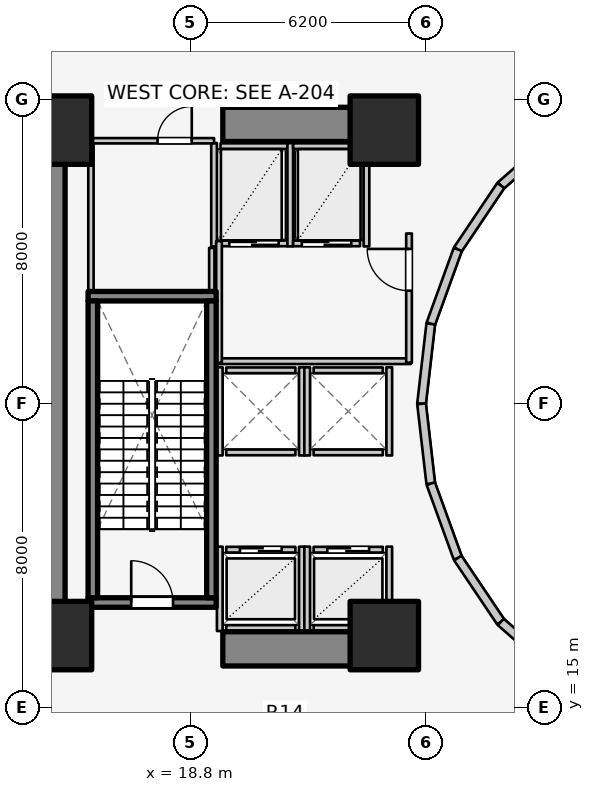
"""IFC4 building model, lengths in metres.
Left out: names, types, materials, properties, quantities, classifications, styles, units other than length and angle.
Written with IfcOpenShell. Run it as: python <this file> out.ifc"""

import sys

from ifc_helpers import new_model, si_unit, direction, frame, frame_2d, origin, origin_2d, place, context, subcontext, project, spatial, rectangle, extrude, element, fill, save


model = new_model("IFC4")
c1 = context("Model", 3, precision=1e-05, world=origin(), true_north=direction((0.0, 1.0)))
c2 = subcontext(c1, "Body", "Model", "MODEL_VIEW")
j1 = project(units=[si_unit("LENGTHUNIT", "METRE"), si_unit("PLANEANGLEUNIT", "RADIAN")], contexts=[c1])
p1 = place(None, origin())
s1 = spatial("IfcSite", under=j1, at=p1, CompositionType="ELEMENT")
p2 = place(p1, origin())
s2 = spatial("IfcBuilding", under=s1, at=p2, CompositionType="ELEMENT")
p3 = place(p2, frame((0.0, 0.0, 9.2)))
s3 = spatial("IfcBuildingStorey", under=s2, at=p3, CompositionType="ELEMENT", Elevation=9.2)
p4 = place(p3, frame((15.05, 17.05, 0.0), z_axis=(0.0, 0.0, 1.0), x_axis=(0.0, 1.0, 0.0)))
e1 = element("IfcWall", 1, at=p4, inside=s3, PredefinedType="SHEAR", context=c2, shape_type="SweptSolid", body=[
    extrude(rectangle(XDim=12.8, YDim=0.9, at=frame_2d((6.4, 0.0))), origin(), (0.0, 0.0, 1.0), 4.6),
])
for number, where, z_axis, x_axis in (
    (2, (19.65, 16.55, 0.0), (0.0, 0.0, 1.0), (1.0, 0.0, 0.0)),
    (3, (19.65, 30.35, 0.0), (0.0, 0.0, 1.0), (1.0, 0.0, 0.0)),
):
    element("IfcWall", number, at=place(p3, frame(where, z_axis=z_axis, x_axis=x_axis)), inside=s3, PredefinedType="SHEAR", context=c2, shape_type="SweptSolid", body=[
        extrude(rectangle(XDim=4.5, YDim=0.9, at=frame_2d((2.25, 0.0))), origin(), (0.0, 0.0, 1.0), 4.6),
    ])
p5 = place(p3, frame((16.105, 17.77, 0.0), z_axis=(0.0, 0.0, 1.0), x_axis=(1.0, 0.0, 0.0)))
e4 = element("IfcWall", 4, at=p5, inside=s3, PredefinedType="SOLIDWALL", context=c2, shape_type="SweptSolid", body=[
    extrude(rectangle(XDim=3.37, YDim=0.25, at=frame_2d((1.685, 0.0))), origin(), (0.0, 0.0, 1.0), 4.6),
])
p6 = place(p5, frame((1.135, 0.0, 0.0)))
e5 = element("IfcOpeningElement", 5, at=p6, cuts=e4, PredefinedType="OPENING", context=c2, shape_type="SweptSolid", body=[
    extrude(rectangle(XDim=1.1, YDim=2.1, at=frame_2d((0.55, 1.05))), frame((0.0, 0.135, 0.0), z_axis=(0.0, -1.0, 0.0), x_axis=(1.0, 0.0, 0.0)), (0.0, 0.0, 1.0), 0.27),
])
p7 = place(p3, frame((16.105, 25.83, 0.0), z_axis=(0.0, 0.0, 1.0), x_axis=(1.0, 0.0, 0.0)))
e6 = element("IfcWall", 6, at=p7, inside=s3, PredefinedType="SOLIDWALL", context=c2, shape_type="SweptSolid", body=[
    extrude(rectangle(XDim=3.37, YDim=0.25, at=frame_2d((1.685, 0.0))), origin(), (0.0, 0.0, 1.0), 4.6),
])
for number, where, z_axis, x_axis in (
    (7, (16.23, 17.895, 0.0), (0.0, 0.0, 1.0), (0.0, 1.0, 0.0)),
    (8, (19.35, 17.895, 0.0), (0.0, 0.0, 1.0), (0.0, 1.0, 0.0)),
):
    element("IfcWall", number, at=place(p3, frame(where, z_axis=z_axis, x_axis=x_axis)), inside=s3, PredefinedType="SOLIDWALL", context=c2, shape_type="SweptSolid", body=[
        extrude(rectangle(XDim=7.81, YDim=0.25, at=frame_2d((3.905, 0.0))), origin(), (0.0, 0.0, 1.0), 4.6),
    ])
for number, where, z_axis, x_axis in (
    (9, (15.3, 16.9, 0.0), (0.0, 0.0, 1.0), (1.0, 0.0, 0.0)),
    (10, (23.9, 16.9, 0.0), (0.0, 0.0, 1.0), (1.0, 0.0, 0.0)),
    (11, (23.9, 30.2, 0.0), (0.0, 0.0, 1.0), (1.0, 0.0, 0.0)),
    (12, (15.3, 30.2, 0.0), (0.0, 0.0, 1.0), (1.0, 0.0, 0.0)),
):
    element("IfcColumn", number, at=place(p3, frame(where, z_axis=z_axis, x_axis=x_axis)), inside=s3, PredefinedType="COLUMN", context=c2, shape_type="SweptSolid", body=[
        extrude(rectangle(XDim=1.8, YDim=1.8, at=origin_2d()), origin(), (0.0, 0.0, 1.0), 4.6),
    ])
p8 = place(p3, frame((28.44, 30.032, 0.0), z_axis=(0.0, 0.0, 1.0), x_axis=(-0.752576694707, -0.658504607869, 0.0)))
e13 = element("IfcWall", 13, at=p8, inside=s3, PredefinedType="STANDARD", context=c2, shape_type="SweptSolid", body=[
    extrude(rectangle(XDim=1.959, YDim=0.23, at=frame_2d((0.98, 0.0))), origin(), (0.0, 0.0, 1.0), 3.28),
])
p9 = place(p3, frame((26.965, 28.742, 0.0), z_axis=(0.0, 0.0, 1.0), x_axis=(-0.558197800898, -0.829707909492, 0.0)))
e14 = element("IfcWall", 14, at=p9, inside=s3, PredefinedType="STANDARD", context=c2, shape_type="SweptSolid", body=[
    extrude(rectangle(XDim=2.027, YDim=0.23, at=frame_2d((1.013, 0.0))), origin(), (0.0, 0.0, 1.0), 3.28),
])
p10 = place(p3, frame((25.834, 27.06, 0.0), z_axis=(0.0, 0.0, 1.0), x_axis=(-0.341423187295, -0.93990968033, 0.0)))
e15 = element("IfcWall", 15, at=p10, inside=s3, PredefinedType="STANDARD", context=c2, shape_type="SweptSolid", body=[
    extrude(rectangle(XDim=2.084, YDim=0.23, at=frame_2d((1.042, 0.0))), origin(), (0.0, 0.0, 1.0), 3.28),
])
for number, where, z_axis, x_axis in (
    (16, (25.123, 25.102, 0.0), (0.0, 0.0, 1.0), (-0.115, -0.993, 0.0)),
    (17, (24.88, 23.0, 0.0), (0.0, 0.0, 1.0), (0.115, -0.993, 0.0)),
):
    element("IfcWall", number, at=place(p3, frame(where, z_axis=z_axis, x_axis=x_axis)), inside=s3, PredefinedType="STANDARD", context=c2, shape_type="SweptSolid", body=[
        extrude(rectangle(XDim=2.115, YDim=0.23, at=frame_2d((1.058, 0.0))), origin(), (0.0, 0.0, 1.0), 3.28),
    ])
p11 = place(p3, frame((25.123, 20.898, 0.0), z_axis=(0.0, 0.0, 1.0), x_axis=(0.341423187295, -0.93990968033, 0.0)))
e18 = element("IfcWall", 18, at=p11, inside=s3, PredefinedType="STANDARD", context=c2, shape_type="SweptSolid", body=[
    extrude(rectangle(XDim=2.084, YDim=0.23, at=frame_2d((1.042, 0.0))), origin(), (0.0, 0.0, 1.0), 3.28),
])
p12 = place(p3, frame((25.834, 18.94, 0.0), z_axis=(0.0, 0.0, 1.0), x_axis=(0.558197800898, -0.829707909492, 0.0)))
e19 = element("IfcWall", 19, at=p12, inside=s3, PredefinedType="STANDARD", context=c2, shape_type="SweptSolid", body=[
    extrude(rectangle(XDim=2.027, YDim=0.23, at=frame_2d((1.013, 0.0))), origin(), (0.0, 0.0, 1.0), 3.28),
])
p13 = place(p3, frame((26.965, 17.258, 0.0), z_axis=(0.0, 0.0, 1.0), x_axis=(0.752576694707, -0.658504607869, 0.0)))
e20 = element("IfcWall", 20, at=p13, inside=s3, PredefinedType="STANDARD", context=c2, shape_type="SweptSolid", body=[
    extrude(rectangle(XDim=1.959, YDim=0.23, at=frame_2d((0.98, 0.0))), origin(), (0.0, 0.0, 1.0), 3.28),
])
p14 = place(p3, frame((19.74, 19.16, 0.0), z_axis=(0.0, 0.0, 1.0), x_axis=(1.0, 0.0, 0.0)))
e21 = element("IfcWall", 21, at=p14, inside=s3, PredefinedType="SOLIDWALL", context=c2, shape_type="SweptSolid", body=[
    extrude(rectangle(XDim=1.82, YDim=0.15, at=frame_2d((0.91, 0.0))), origin(), (0.0, 0.0, 1.0), 4.255),
])
p15 = place(p14, frame((0.36, 0.0, 0.0)))
e22 = element("IfcOpeningElement", 22, at=p15, cuts=e21, PredefinedType="OPENING", context=c2, shape_type="SweptSolid", body=[
    extrude(rectangle(XDim=1.1, YDim=2.1, at=frame_2d((0.55, 1.05))), frame((0.0, 0.085, 0.0), z_axis=(0.0, -1.0, 0.0), x_axis=(1.0, 0.0, 0.0)), (0.0, 0.0, 1.0), 0.17),
])
p16 = place(p3, frame((19.74, 17.1, 0.0), z_axis=(0.0, 0.0, 1.0), x_axis=(1.0, 0.0, 0.0)))
e23 = element("IfcWall", 23, at=p16, inside=s3, PredefinedType="SOLIDWALL", context=c2, shape_type="SweptSolid", body=[
    extrude(rectangle(XDim=1.82, YDim=0.15, at=frame_2d((0.91, 0.0))), origin(), (0.0, 0.0, 1.0), 4.255),
])
p17 = place(p3, frame((19.57, 17.02, 0.0), z_axis=(0.0, 0.0, 1.0), x_axis=(0.0, 1.0, 0.0)))
e24 = element("IfcWall", 24, at=p17, inside=s3, PredefinedType="SOLIDWALL", context=c2, shape_type="SweptSolid", body=[
    extrude(rectangle(XDim=2.22, YDim=0.15, at=frame_2d((1.11, 0.0))), origin(), (0.0, 0.0, 1.0), 3.62),
])
p18 = place(p3, frame((21.73, 17.02, 0.0), z_axis=(0.0, 0.0, 1.0), x_axis=(0.0, 1.0, 0.0)))
e25 = element("IfcWall", 25, at=p18, inside=s3, PredefinedType="SOLIDWALL", context=c2, shape_type="SweptSolid", body=[
    extrude(rectangle(XDim=2.22, YDim=0.15, at=frame_2d((1.11, 0.0))), origin(), (0.0, 0.0, 1.0), 4.255),
])
p19 = place(p3, frame((22.04, 19.16, 0.0), z_axis=(0.0, 0.0, 1.0), x_axis=(1.0, 0.0, 0.0)))
e26 = element("IfcWall", 26, at=p19, inside=s3, PredefinedType="SOLIDWALL", context=c2, shape_type="SweptSolid", body=[
    extrude(rectangle(XDim=1.82, YDim=0.15, at=frame_2d((0.91, 0.0))), origin(), (0.0, 0.0, 1.0), 3.62),
])
p20 = place(p19, frame((0.36, 0.0, 0.0)))
e27 = element("IfcOpeningElement", 27, at=p20, cuts=e26, PredefinedType="OPENING", context=c2, shape_type="SweptSolid", body=[
    extrude(rectangle(XDim=1.1, YDim=2.1, at=frame_2d((0.55, 1.05))), frame((0.0, 0.085, 0.0), z_axis=(0.0, -1.0, 0.0), x_axis=(1.0, 0.0, 0.0)), (0.0, 0.0, 1.0), 0.17),
])
p21 = place(p3, frame((22.04, 17.1, 0.0), z_axis=(0.0, 0.0, 1.0), x_axis=(1.0, 0.0, 0.0)))
e28 = element("IfcWall", 28, at=p21, inside=s3, PredefinedType="SOLIDWALL", context=c2, shape_type="SweptSolid", body=[
    extrude(rectangle(XDim=1.82, YDim=0.15, at=frame_2d((0.91, 0.0))), origin(), (0.0, 0.0, 1.0), 3.62),
])
p22 = place(p3, frame((21.87, 17.02, 0.0), z_axis=(0.0, 0.0, 1.0), x_axis=(0.0, 1.0, 0.0)))
e29 = element("IfcWall", 29, at=p22, inside=s3, PredefinedType="SOLIDWALL", context=c2, shape_type="SweptSolid", body=[
    extrude(rectangle(XDim=2.22, YDim=0.15, at=frame_2d((1.11, 0.0))), origin(), (0.0, 0.0, 1.0), 4.255),
])
p23 = place(p3, frame((24.03, 17.02, 0.0), z_axis=(0.0, 0.0, 1.0), x_axis=(0.0, 1.0, 0.0)))
e30 = element("IfcWall", 30, at=p23, inside=s3, PredefinedType="SOLIDWALL", context=c2, shape_type="SweptSolid", body=[
    extrude(rectangle(XDim=2.22, YDim=0.15, at=frame_2d((1.11, 0.0))), origin(), (0.0, 0.0, 1.0), 3.3),
])
for number, where, z_axis, x_axis in (
    (31, (19.74, 21.72, 0.0), (0.0, 0.0, 1.0), (1.0, 0.0, 0.0)),
    (32, (19.74, 23.88, 0.0), (0.0, 0.0, 1.0), (1.0, 0.0, 0.0)),
):
    element("IfcWall", number, at=place(p3, frame(where, z_axis=z_axis, x_axis=x_axis)), inside=s3, PredefinedType="SOLIDWALL", context=c2, shape_type="SweptSolid", body=[
        extrude(rectangle(XDim=1.82, YDim=0.15, at=frame_2d((0.91, 0.0))), origin(), (0.0, 0.0, 1.0), 4.255),
    ])
for number, where, z_axis, x_axis in (
    (33, (19.57, 21.64, 0.0), (0.0, 0.0, 1.0), (0.0, 1.0, 0.0)),
    (34, (21.73, 21.64, 0.0), (0.0, 0.0, 1.0), (0.0, 1.0, 0.0)),
):
    element("IfcWall", number, at=place(p3, frame(where, z_axis=z_axis, x_axis=x_axis)), inside=s3, PredefinedType="SOLIDWALL", context=c2, shape_type="SweptSolid", body=[
        extrude(rectangle(XDim=2.32, YDim=0.15, at=frame_2d((1.16, 0.0))), origin(), (0.0, 0.0, 1.0), 4.255),
    ])
for number, where, z_axis, x_axis in (
    (35, (22.04, 21.72, 0.0), (0.0, 0.0, 1.0), (1.0, 0.0, 0.0)),
    (36, (22.04, 23.88, 0.0), (0.0, 0.0, 1.0), (1.0, 0.0, 0.0)),
):
    element("IfcWall", number, at=place(p3, frame(where, z_axis=z_axis, x_axis=x_axis)), inside=s3, PredefinedType="SOLIDWALL", context=c2, shape_type="SweptSolid", body=[
        extrude(rectangle(XDim=1.82, YDim=0.15, at=frame_2d((0.91, 0.0))), origin(), (0.0, 0.0, 1.0), 3.62),
    ])
p24 = place(p3, frame((21.87, 21.64, 0.0), z_axis=(0.0, 0.0, 1.0), x_axis=(0.0, 1.0, 0.0)))
e37 = element("IfcWall", 37, at=p24, inside=s3, PredefinedType="SOLIDWALL", context=c2, shape_type="SweptSolid", body=[
    extrude(rectangle(XDim=2.32, YDim=0.15, at=frame_2d((1.16, 0.0))), origin(), (0.0, 0.0, 1.0), 4.255),
])
p25 = place(p3, frame((24.03, 21.64, 0.0), z_axis=(0.0, 0.0, 1.0), x_axis=(0.0, 1.0, 0.0)))
e38 = element("IfcWall", 38, at=p25, inside=s3, PredefinedType="SOLIDWALL", context=c2, shape_type="SweptSolid", body=[
    extrude(rectangle(XDim=2.32, YDim=0.15, at=frame_2d((1.16, 0.0))), origin(), (0.0, 0.0, 1.0), 3.62),
])
p26 = place(p3, frame((19.59, 27.22, 0.0), z_axis=(0.0, 0.0, 1.0), x_axis=(1.0, 0.0, 0.0)))
e39 = element("IfcWall", 39, at=p26, inside=s3, PredefinedType="SOLIDWALL", context=c2, shape_type="SweptSolid", body=[
    extrude(rectangle(XDim=1.76, YDim=0.15, at=frame_2d((0.88, 0.0))), origin(), (0.0, 0.0, 1.0), 4.255),
])
p27 = place(p26, frame((0.23, 0.0, 0.0)))
e40 = element("IfcOpeningElement", 40, at=p27, cuts=e39, PredefinedType="OPENING", context=c2, shape_type="SweptSolid", body=[
    extrude(rectangle(XDim=1.3, YDim=2.1, at=frame_2d((0.65, 1.05))), frame((0.0, 0.085, 0.0), z_axis=(0.0, -1.0, 0.0), x_axis=(1.0, 0.0, 0.0)), (0.0, 0.0, 1.0), 0.17),
])
p28 = place(p3, frame((19.59, 29.78, 0.0), z_axis=(0.0, 0.0, 1.0), x_axis=(1.0, 0.0, 0.0)))
e41 = element("IfcWall", 41, at=p28, inside=s3, PredefinedType="SOLIDWALL", context=c2, shape_type="SweptSolid", body=[
    extrude(rectangle(XDim=1.76, YDim=0.15, at=frame_2d((0.88, 0.0))), origin(), (0.0, 0.0, 1.0), 4.255),
])
for number, where, z_axis, x_axis in (
    (42, (19.42, 27.14, 0.0), (0.0, 0.0, 1.0), (0.0, 1.0, 0.0)),
    (43, (21.425, 27.14, 0.0), (0.0, 0.0, 1.0), (0.0, 1.0, 0.0)),
):
    element("IfcWall", number, at=place(p3, frame(where, z_axis=z_axis, x_axis=x_axis)), inside=s3, PredefinedType="SOLIDWALL", context=c2, shape_type="SweptSolid", body=[
        extrude(rectangle(XDim=2.72, YDim=0.15, at=frame_2d((1.36, 0.0))), origin(), (0.0, 0.0, 1.0), 4.255),
    ])
p29 = place(p3, frame((21.5, 27.22, 0.0), z_axis=(0.0, 0.0, 1.0), x_axis=(1.0, 0.0, 0.0)))
e44 = element("IfcWall", 44, at=p29, inside=s3, PredefinedType="SOLIDWALL", context=c2, shape_type="SweptSolid", body=[
    extrude(rectangle(XDim=1.76, YDim=0.15, at=frame_2d((0.88, 0.0))), origin(), (0.0, 0.0, 1.0), 4.255),
])
p30 = place(p29, frame((0.23, 0.0, 0.0)))
e45 = element("IfcOpeningElement", 45, at=p30, cuts=e44, PredefinedType="OPENING", context=c2, shape_type="SweptSolid", body=[
    extrude(rectangle(XDim=1.3, YDim=2.1, at=frame_2d((0.65, 1.05))), frame((0.0, 0.085, 0.0), z_axis=(0.0, -1.0, 0.0), x_axis=(1.0, 0.0, 0.0)), (0.0, 0.0, 1.0), 0.17),
])
p31 = place(p3, frame((21.5, 29.78, 0.0), z_axis=(0.0, 0.0, 1.0), x_axis=(1.0, 0.0, 0.0)))
e46 = element("IfcWall", 46, at=p31, inside=s3, PredefinedType="SOLIDWALL", context=c2, shape_type="SweptSolid", body=[
    extrude(rectangle(XDim=1.76, YDim=0.15, at=frame_2d((0.88, 0.0))), origin(), (0.0, 0.0, 1.0), 4.255),
])
p32 = place(p3, frame((23.43, 27.14, 0.0), z_axis=(0.0, 0.0, 1.0), x_axis=(0.0, 1.0, 0.0)))
e47 = element("IfcWall", 47, at=p32, inside=s3, PredefinedType="SOLIDWALL", context=c2, shape_type="SweptSolid", body=[
    extrude(rectangle(XDim=2.72, YDim=0.15, at=frame_2d((1.36, 0.0))), origin(), (0.0, 0.0, 1.0), 4.255),
])
p33 = place(p3, frame((19.52, 24.12, 0.0), z_axis=(0.0, 0.0, 1.0), x_axis=(1.0, 0.0, 0.0)))
e48 = element("IfcWall", 48, at=p33, inside=s3, PredefinedType="PARTITIONING", context=c2, shape_type="SweptSolid", body=[
    extrude(rectangle(XDim=5.08, YDim=0.15, at=frame_2d((2.54, 0.0))), origin(), (0.0, 0.0, 1.0), 3.62),
])
p34 = place(p3, frame((19.55, 24.08, 0.0), z_axis=(0.0, 0.0, 1.0), x_axis=(0.0, 1.0, 0.0)))
e49 = element("IfcWall", 49, at=p34, inside=s3, PredefinedType="PARTITIONING", context=c2, shape_type="SweptSolid", body=[
    extrude(rectangle(XDim=3.2, YDim=0.15, at=frame_2d((1.6, 0.0))), origin(), (0.0, 0.0, 1.0), 4.255),
])
p35 = place(p3, frame((24.55, 24.08, 0.0), z_axis=(0.0, 0.0, 1.0), x_axis=(0.0, 1.0, 0.0)))
e50 = element("IfcWall", 50, at=p35, inside=s3, PredefinedType="PARTITIONING", context=c2, shape_type="SweptSolid", body=[
    extrude(rectangle(XDim=3.4, YDim=0.15, at=frame_2d((1.7, 0.0))), origin(), (0.0, 0.0, 1.0), 4.255),
])
p36 = place(p35, frame((1.894, 0.0, 0.0)))
e51 = element("IfcOpeningElement", 51, at=p36, cuts=e50, PredefinedType="OPENING", context=c2, shape_type="SweptSolid", body=[
    extrude(rectangle(XDim=1.1, YDim=2.1, at=frame_2d((0.55, 1.05))), frame((0.0, 0.085, 0.0), z_axis=(0.0, -1.0, 0.0), x_axis=(1.0, 0.0, 0.0)), (0.0, 0.0, 1.0), 0.17),
])
p37 = place(p3, frame((16.12, 29.92, 0.0), z_axis=(0.0, 0.0, 1.0), x_axis=(1.0, 0.0, 0.0)))
e52 = element("IfcWall", 52, at=p37, inside=s3, PredefinedType="PLUMBINGWALL", context=c2, shape_type="SweptSolid", body=[
    extrude(rectangle(XDim=3.3, YDim=0.14, at=frame_2d((1.65, 0.0))), origin(), (0.0, 0.0, 1.0), 4.255),
])
p38 = place(p37, frame((1.813, 0.0, 0.0)))
e53 = element("IfcOpeningElement", 53, at=p38, cuts=e52, PredefinedType="OPENING", context=c2, shape_type="SweptSolid", body=[
    extrude(rectangle(XDim=0.9, YDim=2.1, at=frame_2d((0.45, 1.05))), frame((0.0, 0.08, 0.0), z_axis=(0.0, -1.0, 0.0), x_axis=(1.0, 0.0, 0.0)), (0.0, 0.0, 1.0), 0.16),
])
p39 = place(p3, frame((16.18, 25.98, 0.0), z_axis=(0.0, 0.0, 1.0), x_axis=(0.0, 1.0, 0.0)))
e54 = element("IfcWall", 54, at=p39, inside=s3, PredefinedType="PLUMBINGWALL", context=c2, shape_type="SweptSolid", body=[
    extrude(rectangle(XDim=3.88, YDim=0.14, at=frame_2d((1.94, 0.0))), origin(), (0.0, 0.0, 1.0), 4.255),
])
p40 = place(p3, frame((19.36, 25.98, 0.0), z_axis=(0.0, 0.0, 1.0), x_axis=(0.0, 1.0, 0.0)))
e55 = element("IfcWall", 55, at=p40, inside=s3, PredefinedType="PLUMBINGWALL", context=c2, shape_type="SweptSolid", body=[
    extrude(rectangle(XDim=1.12, YDim=0.14, at=frame_2d((0.56, 0.0))), origin(), (0.0, 0.0, 1.0), 4.255),
])
p41 = place(p6, origin())
e56 = element("IfcDoor", 56, at=p41, inside=s3, OperationType="SINGLE_SWING_LEFT", PredefinedType="DOOR", context=c2, shape_type="SweptSolid", body=[
    extrude(rectangle(XDim=1.1, YDim=2.1, at=frame_2d((0.55, 1.05))), frame((0.0, 0.025, 0.0), z_axis=(0.0, -1.0, 0.0), x_axis=(1.0, 0.0, 0.0)), (0.0, 0.0, 1.0), 0.05),
])
fill(e5, e56)
p42 = place(p15, origin())
e57 = element("IfcDoor", 57, at=p42, inside=s3, OperationType="DOUBLE_DOOR_SLIDING", PredefinedType="DOOR", context=c2, shape_type="SweptSolid", body=[
    extrude(rectangle(XDim=1.1, YDim=2.1, at=frame_2d((0.55, 1.05))), frame((0.0, 0.025, 0.0), z_axis=(0.0, -1.0, 0.0), x_axis=(1.0, 0.0, 0.0)), (0.0, 0.0, 1.0), 0.05),
])
fill(e22, e57)
p43 = place(p20, origin())
e58 = element("IfcDoor", 58, at=p43, inside=s3, OperationType="DOUBLE_DOOR_SLIDING", PredefinedType="DOOR", context=c2, shape_type="SweptSolid", body=[
    extrude(rectangle(XDim=1.1, YDim=2.1, at=frame_2d((0.55, 1.05))), frame((0.0, 0.025, 0.0), z_axis=(0.0, -1.0, 0.0), x_axis=(1.0, 0.0, 0.0)), (0.0, 0.0, 1.0), 0.05),
])
fill(e27, e58)
p44 = place(p27, origin())
e59 = element("IfcDoor", 59, at=p44, inside=s3, OperationType="DOUBLE_DOOR_SLIDING", PredefinedType="DOOR", context=c2, shape_type="SweptSolid", body=[
    extrude(rectangle(XDim=1.3, YDim=2.1, at=frame_2d((0.65, 1.05))), frame((0.0, 0.025, 0.0), z_axis=(0.0, -1.0, 0.0), x_axis=(1.0, 0.0, 0.0)), (0.0, 0.0, 1.0), 0.05),
])
fill(e40, e59)
p45 = place(p30, origin())
e60 = element("IfcDoor", 60, at=p45, inside=s3, OperationType="DOUBLE_DOOR_SLIDING", PredefinedType="DOOR", context=c2, shape_type="SweptSolid", body=[
    extrude(rectangle(XDim=1.3, YDim=2.1, at=frame_2d((0.65, 1.05))), frame((0.0, 0.025, 0.0), z_axis=(0.0, -1.0, 0.0), x_axis=(1.0, 0.0, 0.0)), (0.0, 0.0, 1.0), 0.05),
])
fill(e45, e60)
p46 = place(p36, origin())
e61 = element("IfcDoor", 61, at=p46, inside=s3, OperationType="SINGLE_SWING_RIGHT", PredefinedType="DOOR", context=c2, shape_type="SweptSolid", body=[
    extrude(rectangle(XDim=1.1, YDim=2.1, at=frame_2d((0.55, 1.05))), frame((0.0, 0.025, 0.0), z_axis=(0.0, -1.0, 0.0), x_axis=(1.0, 0.0, 0.0)), (0.0, 0.0, 1.0), 0.05),
])
fill(e51, e61)
p47 = place(p38, origin())
e62 = element("IfcDoor", 62, at=p47, inside=s3, OperationType="SINGLE_SWING_RIGHT", PredefinedType="DOOR", context=c2, shape_type="SweptSolid", body=[
    extrude(rectangle(XDim=0.9, YDim=2.1, at=frame_2d((0.45, 1.05))), frame((0.0, 0.025, 0.0), z_axis=(0.0, -1.0, 0.0), x_axis=(1.0, 0.0, 0.0)), (0.0, 0.0, 1.0), 0.05),
])
fill(e53, e62)
save(model, sys.argv[1])
